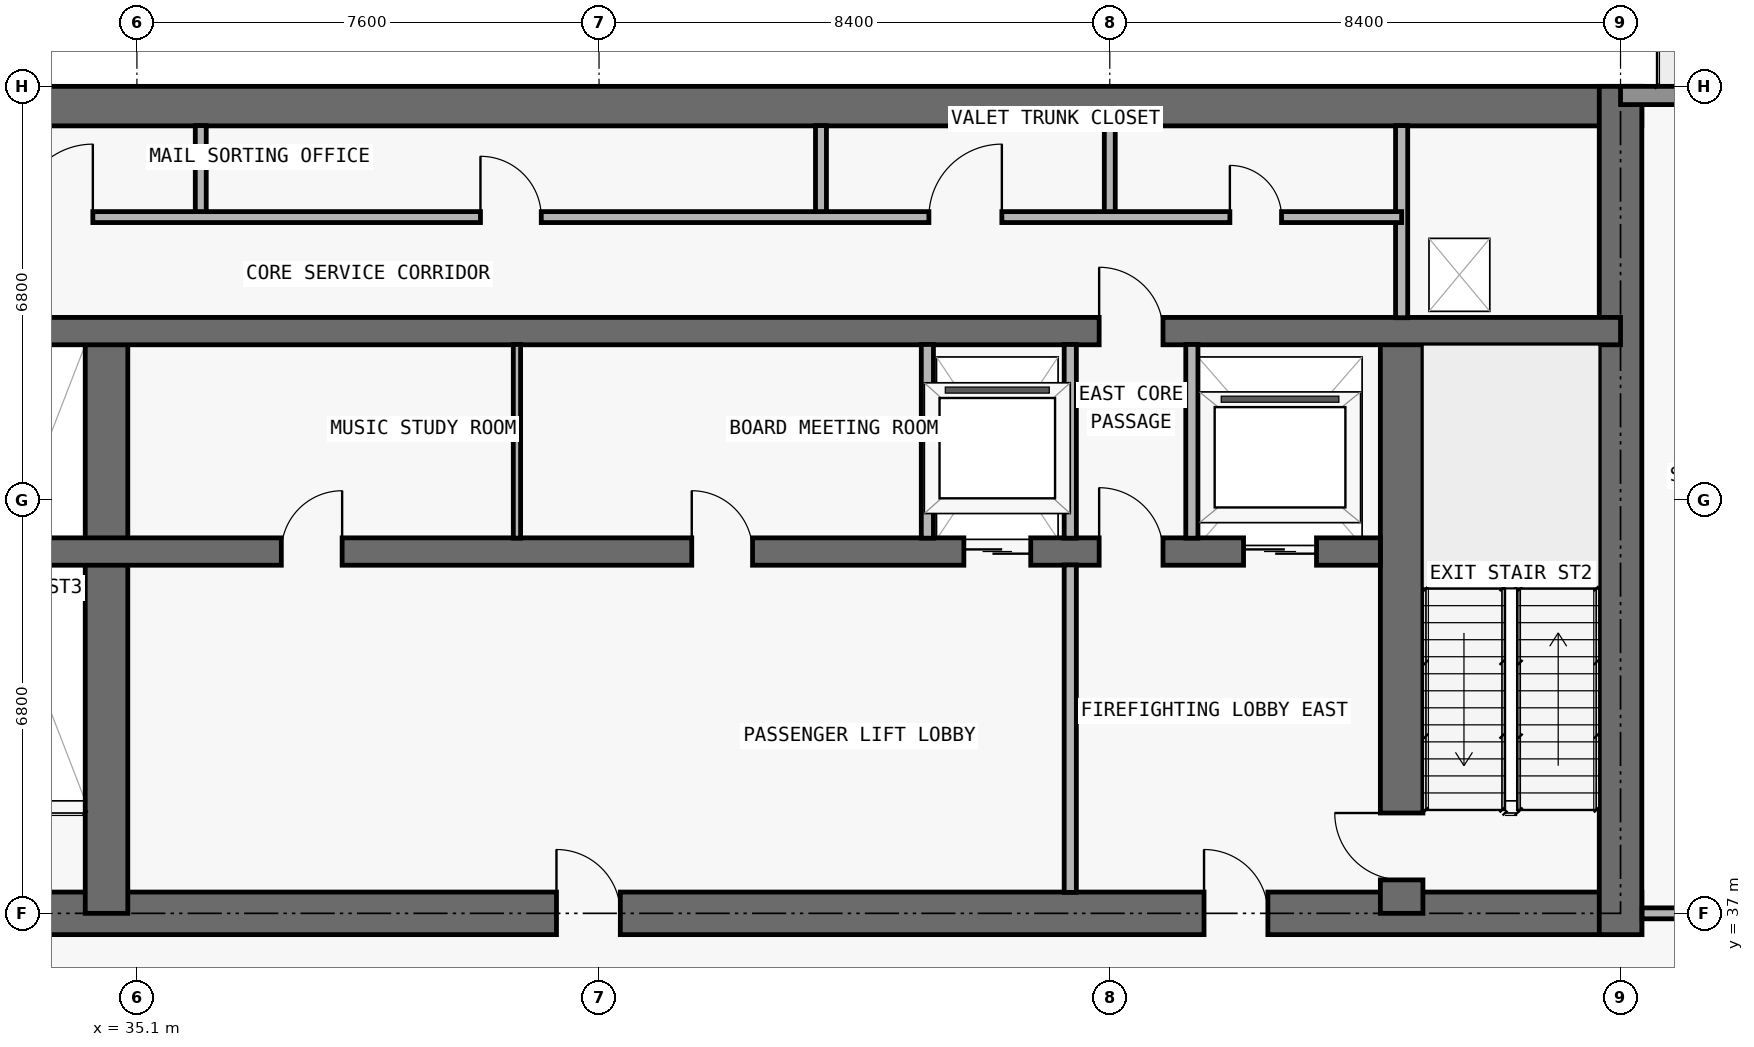
"""IFC4 building model, lengths in metres.
Left out: names, types, materials, properties, quantities, classifications, styles, units other than length and angle.
Written with IfcOpenShell. Run it as: python <this file> out.ifc"""

import sys

from ifc_helpers import new_model, si_unit, direction, frame, frame_2d, origin, place, context, subcontext, project, spatial, rectangle, extrude, element, fill, save


model = new_model("IFC4")
c1 = context("Model", 3, precision=1e-05, world=origin(), true_north=direction((0.0, 1.0)))
c2 = subcontext(c1, "Body", "Model", "MODEL_VIEW")
j1 = project(units=[si_unit("LENGTHUNIT", "METRE"), si_unit("PLANEANGLEUNIT", "RADIAN")], contexts=[c1])
p1 = place(None, origin())
s1 = spatial("IfcSite", under=j1, at=p1, CompositionType="ELEMENT")
p2 = place(p1, origin())
s2 = spatial("IfcBuilding", under=s1, at=p2, CompositionType="ELEMENT")
p3 = place(p2, frame((0.0, 0.0, 269.4)))
s3 = spatial("IfcBuildingStorey", under=s2, at=p3, CompositionType="ELEMENT", Elevation=269.4)
p4 = place(p3, frame((17.95, 37.0, 0.0), z_axis=(0.0, 0.0, 1.0), x_axis=(1.0, 0.0, 0.0)))
e1 = element("IfcWall", 1, at=p4, inside=s3, PredefinedType="SHEAR", context=c2, shape_type="SweptSolid", body=[
    extrude(rectangle(XDim=41.9, YDim=0.7, at=frame_2d((20.95, 0.0))), origin(), (0.0, 0.0, 1.0), 4.5),
])
p5 = place(p4, frame((14.35, 0.0, 0.0)))
e2 = element("IfcOpeningElement", 2, at=p5, cuts=e1, PredefinedType="OPENING", context=c2, shape_type="SweptSolid", body=[
    extrude(rectangle(XDim=1.1, YDim=2.15, at=frame_2d((0.55, 1.075))), frame((0.0, 0.36, 0.0), z_axis=(0.0, -1.0, 0.0), x_axis=(1.0, 0.0, 0.0)), (0.0, 0.0, 1.0), 0.72),
])
p6 = place(p4, frame((6.2, 0.0, 0.0)))
e3 = element("IfcOpeningElement", 3, at=p6, cuts=e1, PredefinedType="OPENING", context=c2, shape_type="SweptSolid", body=[
    extrude(rectangle(XDim=1.05, YDim=2.15, at=frame_2d((0.525, 1.075))), frame((0.0, 0.36, 0.0), z_axis=(0.0, -1.0, 0.0), x_axis=(1.0, 0.0, 0.0)), (0.0, 0.0, 1.0), 0.72),
])
p7 = place(p4, frame((34.7, 0.0, 0.0)))
e4 = element("IfcOpeningElement", 4, at=p7, cuts=e1, PredefinedType="OPENING", context=c2, shape_type="SweptSolid", body=[
    extrude(rectangle(XDim=1.05, YDim=2.15, at=frame_2d((0.525, 1.075))), frame((0.0, 0.36, 0.0), z_axis=(0.0, -1.0, 0.0), x_axis=(1.0, 0.0, 0.0)), (0.0, 0.0, 1.0), 0.72),
])
p8 = place(p4, frame((10.812, 0.0, 0.0)))
e5 = element("IfcOpeningElement", 5, at=p8, cuts=e1, PredefinedType="OPENING", context=c2, shape_type="SweptSolid", body=[
    extrude(rectangle(XDim=1.05, YDim=2.15, at=frame_2d((0.525, 1.075))), frame((0.0, 0.36, 0.0), z_axis=(0.0, -1.0, 0.0), x_axis=(1.0, 0.0, 0.0)), (0.0, 0.0, 1.0), 0.72),
])
p9 = place(p4, frame((24.05, 0.0, 0.0)))
e6 = element("IfcOpeningElement", 6, at=p9, cuts=e1, PredefinedType="OPENING", context=c2, shape_type="SweptSolid", body=[
    extrude(rectangle(XDim=1.05, YDim=2.15, at=frame_2d((0.525, 1.075))), frame((0.0, 0.36, 0.0), z_axis=(0.0, -1.0, 0.0), x_axis=(1.0, 0.0, 0.0)), (0.0, 0.0, 1.0), 0.72),
])
p10 = place(p3, frame((17.95, 50.275, 0.0), z_axis=(0.0, 0.0, 1.0), x_axis=(1.0, 0.0, 0.0)))
e7 = element("IfcWall", 7, at=p10, inside=s3, PredefinedType="SHEAR", context=c2, shape_type="SweptSolid", body=[
    extrude(rectangle(XDim=41.9, YDim=0.65, at=frame_2d((20.95, 0.0))), origin(), (0.0, 0.0, 1.0), 4.5),
])
p11 = place(p3, frame((59.5, 36.65, 0.0), z_axis=(0.0, 0.0, 1.0), x_axis=(0.0, 1.0, 0.0)))
e8 = element("IfcWall", 8, at=p11, inside=s3, PredefinedType="SHEAR", context=c2, shape_type="SweptSolid", body=[
    extrude(rectangle(XDim=13.95, YDim=0.7, at=frame_2d((6.975, 0.0))), origin(), (0.0, 0.0, 1.0), 4.5),
])
p12 = place(p3, frame((55.9, 37.0, 0.0), z_axis=(0.0, 0.0, 1.0), x_axis=(0.0, 1.0, 0.0)))
e9 = element("IfcWall", 9, at=p12, inside=s3, PredefinedType="SHEAR", context=c2, shape_type="SweptSolid", body=[
    extrude(rectangle(XDim=9.575, YDim=0.7, at=frame_2d((4.788, 0.0))), origin(), (0.0, 0.0, 1.0), 4.5),
])
p13 = place(p12, frame((0.55, 0.0, 0.0)))
e10 = element("IfcOpeningElement", 10, at=p13, cuts=e9, PredefinedType="OPENING", context=c2, shape_type="SweptSolid", body=[
    extrude(rectangle(XDim=1.1, YDim=2.15, at=frame_2d((0.55, 1.075))), frame((0.0, 0.36, 0.0), z_axis=(0.0, -1.0, 0.0), x_axis=(1.0, 0.0, 0.0)), (0.0, 0.0, 1.0), 0.72),
])
p14 = place(p3, frame((34.6, 37.0, 0.0), z_axis=(0.0, 0.0, 1.0), x_axis=(0.0, 1.0, 0.0)))
e11 = element("IfcWall", 11, at=p14, inside=s3, PredefinedType="SHEAR", context=c2, shape_type="SweptSolid", body=[
    extrude(rectangle(XDim=9.575, YDim=0.7, at=frame_2d((4.788, 0.0))), origin(), (0.0, 0.0, 1.0), 4.5),
])
p15 = place(p3, frame((22.25, 42.95, 0.0), z_axis=(0.0, 0.0, 1.0), x_axis=(1.0, 0.0, 0.0)))
e12 = element("IfcWall", 12, at=p15, inside=s3, PredefinedType="SHEAR", context=c2, shape_type="SweptSolid", body=[
    extrude(rectangle(XDim=33.3, YDim=0.45, at=frame_2d((16.65, 0.0))), origin(), (0.0, 0.0, 1.0), 4.5),
])
p16 = place(p15, frame((1.05, 0.0, 0.0)))
e13 = element("IfcOpeningElement", 13, at=p16, cuts=e12, PredefinedType="OPENING", context=c2, shape_type="SweptSolid", body=[
    extrude(rectangle(XDim=1.2, YDim=2.2, at=frame_2d((0.6, 1.1))), frame((0.0, 0.235, 0.0), z_axis=(0.0, -1.0, 0.0), x_axis=(1.0, 0.0, 0.0)), (0.0, 0.0, 1.0), 0.47),
])
p17 = place(p15, frame((31.05, 0.0, 0.0)))
e14 = element("IfcOpeningElement", 14, at=p17, cuts=e12, PredefinedType="OPENING", context=c2, shape_type="SweptSolid", body=[
    extrude(rectangle(XDim=1.2, YDim=2.2, at=frame_2d((0.6, 1.1))), frame((0.0, 0.235, 0.0), z_axis=(0.0, -1.0, 0.0), x_axis=(1.0, 0.0, 0.0)), (0.0, 0.0, 1.0), 0.47),
])
p18 = place(p15, frame((26.45, 0.0, 0.0)))
e15 = element("IfcOpeningElement", 15, at=p18, cuts=e12, PredefinedType="OPENING", context=c2, shape_type="SweptSolid", body=[
    extrude(rectangle(XDim=1.1, YDim=2.2, at=frame_2d((0.55, 1.1))), frame((0.0, 0.235, 0.0), z_axis=(0.0, -1.0, 0.0), x_axis=(1.0, 0.0, 0.0)), (0.0, 0.0, 1.0), 0.47),
])
p19 = place(p15, frame((5.95, 0.0, 0.0)))
e16 = element("IfcOpeningElement", 16, at=p19, cuts=e12, PredefinedType="OPENING", context=c2, shape_type="SweptSolid", body=[
    extrude(rectangle(XDim=1.1, YDim=2.2, at=frame_2d((0.55, 1.1))), frame((0.0, 0.235, 0.0), z_axis=(0.0, -1.0, 0.0), x_axis=(1.0, 0.0, 0.0)), (0.0, 0.0, 1.0), 0.47),
])
p20 = place(p15, frame((3.625, 0.0, 0.0)))
e17 = element("IfcOpeningElement", 17, at=p20, cuts=e12, PredefinedType="OPENING", context=c2, shape_type="SweptSolid", body=[
    extrude(rectangle(XDim=1.05, YDim=2.15, at=frame_2d((0.525, 1.075))), frame((0.0, 0.235, 0.0), z_axis=(0.0, -1.0, 0.0), x_axis=(1.0, 0.0, 0.0)), (0.0, 0.0, 1.0), 0.47),
])
p21 = place(p15, frame((28.675, 0.0, 0.0)))
e18 = element("IfcOpeningElement", 18, at=p21, cuts=e12, PredefinedType="OPENING", context=c2, shape_type="SweptSolid", body=[
    extrude(rectangle(XDim=1.05, YDim=2.15, at=frame_2d((0.525, 1.075))), frame((0.0, 0.235, 0.0), z_axis=(0.0, -1.0, 0.0), x_axis=(1.0, 0.0, 0.0)), (0.0, 0.0, 1.0), 0.47),
])
p22 = place(p15, frame((15.225, 0.0, 0.0)))
e19 = element("IfcOpeningElement", 19, at=p22, cuts=e12, PredefinedType="OPENING", context=c2, shape_type="SweptSolid", body=[
    extrude(rectangle(XDim=1.0, YDim=2.2, at=frame_2d((0.5, 1.1))), frame((0.0, 0.235, 0.0), z_axis=(0.0, -1.0, 0.0), x_axis=(1.0, 0.0, 0.0)), (0.0, 0.0, 1.0), 0.47),
])
p23 = place(p15, frame((21.975, 0.0, 0.0)))
e20 = element("IfcOpeningElement", 20, at=p23, cuts=e12, PredefinedType="OPENING", context=c2, shape_type="SweptSolid", body=[
    extrude(rectangle(XDim=1.0, YDim=2.2, at=frame_2d((0.5, 1.1))), frame((0.0, 0.235, 0.0), z_axis=(0.0, -1.0, 0.0), x_axis=(1.0, 0.0, 0.0)), (0.0, 0.0, 1.0), 0.47),
])
p24 = place(p3, frame((18.3, 46.575, 0.0), z_axis=(0.0, 0.0, 1.0), x_axis=(1.0, 0.0, 0.0)))
e21 = element("IfcWall", 21, at=p24, inside=s3, PredefinedType="SHEAR", context=c2, shape_type="SweptSolid", body=[
    extrude(rectangle(XDim=41.2, YDim=0.45, at=frame_2d((20.6, 0.0))), origin(), (0.0, 0.0, 1.0), 4.5),
])
p25 = place(p24, frame((7.575, 0.0, 0.0)))
e22 = element("IfcOpeningElement", 22, at=p25, cuts=e21, PredefinedType="OPENING", context=c2, shape_type="SweptSolid", body=[
    extrude(rectangle(XDim=1.05, YDim=2.15, at=frame_2d((0.525, 1.075))), frame((0.0, 0.235, 0.0), z_axis=(0.0, -1.0, 0.0), x_axis=(1.0, 0.0, 0.0)), (0.0, 0.0, 1.0), 0.47),
])
p26 = place(p24, frame((32.625, 0.0, 0.0)))
e23 = element("IfcOpeningElement", 23, at=p26, cuts=e21, PredefinedType="OPENING", context=c2, shape_type="SweptSolid", body=[
    extrude(rectangle(XDim=1.05, YDim=2.15, at=frame_2d((0.525, 1.075))), frame((0.0, 0.235, 0.0), z_axis=(0.0, -1.0, 0.0), x_axis=(1.0, 0.0, 0.0)), (0.0, 0.0, 1.0), 0.47),
])
p27 = place(p3, frame((59.5, 50.45, 0.0), z_axis=(0.0, 0.0, 1.0), x_axis=(1.0, 0.0, 0.0)))
e24 = element("IfcWall", 24, at=p27, inside=s3, PredefinedType="STANDARD", context=c2, shape_type="SweptSolid", body=[
    extrude(rectangle(XDim=6.2, YDim=0.3, at=frame_2d((3.1, 0.0))), origin(), (0.0, 0.0, 1.0), 4.5),
])
p28 = place(p27, frame((2.1, 0.0, 0.0)))
e25 = element("IfcOpeningElement", 25, at=p28, cuts=e24, PredefinedType="OPENING", context=c2, shape_type="SweptSolid", body=[
    extrude(rectangle(XDim=2.0, YDim=2.3, at=frame_2d((1.0, 1.15))), frame((0.0, 0.16, 0.0), z_axis=(0.0, -1.0, 0.0), x_axis=(1.0, 0.0, 0.0)), (0.0, 0.0, 1.0), 0.32),
])
p29 = place(p3, frame((36.15, 48.45, 0.0), z_axis=(0.0, 0.0, 1.0), x_axis=(0.0, 1.0, 0.0)))
e26 = element("IfcWall", 26, at=p29, inside=s3, PredefinedType="PARTITIONING", context=c2, shape_type="SweptSolid", body=[
    extrude(rectangle(XDim=1.505, YDim=0.18, at=frame_2d((0.752, 0.0))), origin(), (0.0, 0.0, 1.0), 4.5),
])
p30 = place(p3, frame((41.35, 43.17, 0.0), z_axis=(0.0, 0.0, 1.0), x_axis=(0.0, 1.0, 0.0)))
e27 = element("IfcWall", 27, at=p30, inside=s3, PredefinedType="PARTITIONING", context=c2, shape_type="SweptSolid", body=[
    extrude(rectangle(XDim=3.185, YDim=0.12, at=frame_2d((1.593, 0.0))), origin(), (0.0, 0.0, 1.0), 4.5),
])
p31 = place(p3, frame((46.35, 48.45, 0.0), z_axis=(0.0, 0.0, 1.0), x_axis=(0.0, 1.0, 0.0)))
e28 = element("IfcWall", 28, at=p31, inside=s3, PredefinedType="PARTITIONING", context=c2, shape_type="SweptSolid", body=[
    extrude(rectangle(XDim=1.505, YDim=0.18, at=frame_2d((0.752, 0.0))), origin(), (0.0, 0.0, 1.0), 4.5),
])
p32 = place(p3, frame((48.1, 43.17, 0.0), z_axis=(0.0, 0.0, 1.0), x_axis=(0.0, 1.0, 0.0)))
e29 = element("IfcWall", 29, at=p32, inside=s3, PredefinedType="PARTITIONING", context=c2, shape_type="SweptSolid", body=[
    extrude(rectangle(XDim=3.185, YDim=0.2, at=frame_2d((1.593, 0.0))), origin(), (0.0, 0.0, 1.0), 4.5),
])
p33 = place(p3, frame((50.45, 37.345, 0.0), z_axis=(0.0, 0.0, 1.0), x_axis=(0.0, 1.0, 0.0)))
e30 = element("IfcWall", 30, at=p33, inside=s3, PredefinedType="PARTITIONING", context=c2, shape_type="SweptSolid", body=[
    extrude(rectangle(XDim=5.385, YDim=0.2, at=frame_2d((2.692, 0.0))), origin(), (0.0, 0.0, 1.0), 4.5),
])
p34 = place(p3, frame((50.45, 43.17, 0.0), z_axis=(0.0, 0.0, 1.0), x_axis=(0.0, 1.0, 0.0)))
e31 = element("IfcWall", 31, at=p34, inside=s3, PredefinedType="PARTITIONING", context=c2, shape_type="SweptSolid", body=[
    extrude(rectangle(XDim=3.185, YDim=0.2, at=frame_2d((1.593, 0.0))), origin(), (0.0, 0.0, 1.0), 4.5),
])
p35 = place(p3, frame((51.1, 48.45, 0.0), z_axis=(0.0, 0.0, 1.0), x_axis=(0.0, 1.0, 0.0)))
e32 = element("IfcWall", 32, at=p35, inside=s3, PredefinedType="PARTITIONING", context=c2, shape_type="SweptSolid", body=[
    extrude(rectangle(XDim=1.505, YDim=0.18, at=frame_2d((0.752, 0.0))), origin(), (0.0, 0.0, 1.0), 4.5),
])
p36 = place(p3, frame((52.45, 43.17, 0.0), z_axis=(0.0, 0.0, 1.0), x_axis=(0.0, 1.0, 0.0)))
e33 = element("IfcWall", 33, at=p36, inside=s3, PredefinedType="PARTITIONING", context=c2, shape_type="SweptSolid", body=[
    extrude(rectangle(XDim=3.185, YDim=0.2, at=frame_2d((1.593, 0.0))), origin(), (0.0, 0.0, 1.0), 4.5),
])
p37 = place(p3, frame((55.9, 46.795, 0.0), z_axis=(0.0, 0.0, 1.0), x_axis=(0.0, 1.0, 0.0)))
e34 = element("IfcWall", 34, at=p37, inside=s3, PredefinedType="PARTITIONING", context=c2, shape_type="SweptSolid", body=[
    extrude(rectangle(XDim=3.16, YDim=0.2, at=frame_2d((1.58, 0.0))), origin(), (0.0, 0.0, 1.0), 4.5),
])
p38 = place(p3, frame((59.855, 37.0, 0.0), z_axis=(0.0, 0.0, 1.0), x_axis=(1.0, 0.0, 0.0)))
e35 = element("IfcWall", 35, at=p38, inside=s3, PredefinedType="PARTITIONING", context=c2, shape_type="SweptSolid", body=[
    extrude(rectangle(XDim=5.845, YDim=0.18, at=frame_2d((2.922, 0.0))), origin(), (0.0, 0.0, 1.0), 4.5),
])
p39 = place(p38, frame((2.323, 0.0, 0.0)))
e36 = element("IfcOpeningElement", 36, at=p39, cuts=e35, PredefinedType="OPENING", context=c2, shape_type="SweptSolid", body=[
    extrude(rectangle(XDim=1.2, YDim=2.2, at=frame_2d((0.6, 1.1))), frame((0.0, 0.1, 0.0), z_axis=(0.0, -1.0, 0.0), x_axis=(1.0, 0.0, 0.0)), (0.0, 0.0, 1.0), 0.2),
])
p40 = place(p3, frame((26.7, 48.45, 0.0), z_axis=(0.0, 0.0, 1.0), x_axis=(1.0, 0.0, 0.0)))
e37 = element("IfcWall", 37, at=p40, inside=s3, PredefinedType="PARTITIONING", context=c2, shape_type="SweptSolid", body=[
    extrude(rectangle(XDim=29.2, YDim=0.18, at=frame_2d((14.6, 0.0))), origin(), (0.0, 0.0, 1.0), 4.5),
])
p41 = place(p40, frame((1.75, 0.0, 0.0)))
e38 = element("IfcOpeningElement", 38, at=p41, cuts=e37, PredefinedType="OPENING", context=c2, shape_type="SweptSolid", body=[
    extrude(rectangle(XDim=1.2, YDim=2.2, at=frame_2d((0.6, 1.1))), frame((0.0, 0.1, 0.0), z_axis=(0.0, -1.0, 0.0), x_axis=(1.0, 0.0, 0.0)), (0.0, 0.0, 1.0), 0.2),
])
p42 = place(p40, frame((6.475, 0.0, 0.0)))
e39 = element("IfcOpeningElement", 39, at=p42, cuts=e37, PredefinedType="OPENING", context=c2, shape_type="SweptSolid", body=[
    extrude(rectangle(XDim=1.2, YDim=2.2, at=frame_2d((0.6, 1.1))), frame((0.0, 0.1, 0.0), z_axis=(0.0, -1.0, 0.0), x_axis=(1.0, 0.0, 0.0)), (0.0, 0.0, 1.0), 0.2),
])
p43 = place(p40, frame((14.05, 0.0, 0.0)))
e40 = element("IfcOpeningElement", 40, at=p43, cuts=e37, PredefinedType="OPENING", context=c2, shape_type="SweptSolid", body=[
    extrude(rectangle(XDim=1.0, YDim=2.2, at=frame_2d((0.5, 1.1))), frame((0.0, 0.1, 0.0), z_axis=(0.0, -1.0, 0.0), x_axis=(1.0, 0.0, 0.0)), (0.0, 0.0, 1.0), 0.2),
])
p44 = place(p40, frame((21.425, 0.0, 0.0)))
e41 = element("IfcOpeningElement", 41, at=p44, cuts=e37, PredefinedType="OPENING", context=c2, shape_type="SweptSolid", body=[
    extrude(rectangle(XDim=1.2, YDim=2.2, at=frame_2d((0.6, 1.1))), frame((0.0, 0.1, 0.0), z_axis=(0.0, -1.0, 0.0), x_axis=(1.0, 0.0, 0.0)), (0.0, 0.0, 1.0), 0.2),
])
p45 = place(p40, frame((26.375, 0.0, 0.0)))
e42 = element("IfcOpeningElement", 42, at=p45, cuts=e37, PredefinedType="OPENING", context=c2, shape_type="SweptSolid", body=[
    extrude(rectangle(XDim=0.85, YDim=2.1, at=frame_2d((0.425, 1.05))), frame((0.0, 0.1, 0.0), z_axis=(0.0, -1.0, 0.0), x_axis=(1.0, 0.0, 0.0)), (0.0, 0.0, 1.0), 0.2),
])
p46 = place(p17, origin())
e43 = element("IfcDoor", 43, at=p46, inside=s3, OperationType="DOUBLE_DOOR_SLIDING", PredefinedType="DOOR", context=c2, shape_type="SweptSolid", body=[
    extrude(rectangle(XDim=1.2, YDim=2.2, at=frame_2d((0.6, 1.1))), frame((0.0, 0.025, 0.0), z_axis=(0.0, -1.0, 0.0), x_axis=(1.0, 0.0, 0.0)), (0.0, 0.0, 1.0), 0.05),
])
fill(e14, e43)
p47 = place(p18, origin())
e44 = element("IfcDoor", 44, at=p47, inside=s3, OperationType="DOUBLE_DOOR_SLIDING", PredefinedType="DOOR", context=c2, shape_type="SweptSolid", body=[
    extrude(rectangle(XDim=1.1, YDim=2.2, at=frame_2d((0.55, 1.1))), frame((0.0, 0.025, 0.0), z_axis=(0.0, -1.0, 0.0), x_axis=(1.0, 0.0, 0.0)), (0.0, 0.0, 1.0), 0.05),
])
fill(e15, e44)
p48 = place(p7, origin())
e45 = element("IfcDoor", 45, at=p48, inside=s3, OperationType="SINGLE_SWING_LEFT", PredefinedType="DOOR", context=c2, shape_type="SweptSolid", body=[
    extrude(rectangle(XDim=1.05, YDim=2.15, at=frame_2d((0.525, 1.075))), frame((0.0, 0.025, 0.0), z_axis=(0.0, -1.0, 0.0), x_axis=(1.0, 0.0, 0.0)), (0.0, 0.0, 1.0), 0.05),
])
fill(e4, e45)
p49 = place(p13, origin())
e46 = element("IfcDoor", 46, at=p49, inside=s3, OperationType="SINGLE_SWING_RIGHT", PredefinedType="DOOR", context=c2, shape_type="SweptSolid", body=[
    extrude(rectangle(XDim=1.1, YDim=2.15, at=frame_2d((0.55, 1.075))), frame((0.0, 0.025, 0.0), z_axis=(0.0, -1.0, 0.0), x_axis=(1.0, 0.0, 0.0)), (0.0, 0.0, 1.0), 0.05),
])
fill(e10, e46)
p50 = place(p21, origin())
e47 = element("IfcDoor", 47, at=p50, inside=s3, OperationType="SINGLE_SWING_LEFT", PredefinedType="DOOR", context=c2, shape_type="SweptSolid", body=[
    extrude(rectangle(XDim=1.05, YDim=2.15, at=frame_2d((0.525, 1.075))), frame((0.0, 0.025, 0.0), z_axis=(0.0, -1.0, 0.0), x_axis=(1.0, 0.0, 0.0)), (0.0, 0.0, 1.0), 0.05),
])
fill(e18, e47)
p51 = place(p9, origin())
e48 = element("IfcDoor", 48, at=p51, inside=s3, OperationType="SINGLE_SWING_LEFT", PredefinedType="DOOR", context=c2, shape_type="SweptSolid", body=[
    extrude(rectangle(XDim=1.05, YDim=2.15, at=frame_2d((0.525, 1.075))), frame((0.0, 0.025, 0.0), z_axis=(0.0, -1.0, 0.0), x_axis=(1.0, 0.0, 0.0)), (0.0, 0.0, 1.0), 0.05),
])
fill(e6, e48)
p52 = place(p22, origin())
e49 = element("IfcDoor", 49, at=p52, inside=s3, OperationType="SINGLE_SWING_RIGHT", PredefinedType="DOOR", context=c2, shape_type="SweptSolid", body=[
    extrude(rectangle(XDim=1.0, YDim=2.2, at=frame_2d((0.5, 1.1))), frame((0.0, 0.025, 0.0), z_axis=(0.0, -1.0, 0.0), x_axis=(1.0, 0.0, 0.0)), (0.0, 0.0, 1.0), 0.05),
])
fill(e19, e49)
p53 = place(p23, origin())
e50 = element("IfcDoor", 50, at=p53, inside=s3, OperationType="SINGLE_SWING_LEFT", PredefinedType="DOOR", context=c2, shape_type="SweptSolid", body=[
    extrude(rectangle(XDim=1.0, YDim=2.2, at=frame_2d((0.5, 1.1))), frame((0.0, 0.025, 0.0), z_axis=(0.0, -1.0, 0.0), x_axis=(1.0, 0.0, 0.0)), (0.0, 0.0, 1.0), 0.05),
])
fill(e20, e50)
p54 = place(p26, origin())
e51 = element("IfcDoor", 51, at=p54, inside=s3, OperationType="SINGLE_SWING_LEFT", PredefinedType="DOOR", context=c2, shape_type="SweptSolid", body=[
    extrude(rectangle(XDim=1.05, YDim=2.15, at=frame_2d((0.525, 1.075))), frame((0.0, 0.025, 0.0), z_axis=(0.0, -1.0, 0.0), x_axis=(1.0, 0.0, 0.0)), (0.0, 0.0, 1.0), 0.05),
])
fill(e23, e51)
p55 = place(p42, origin())
e52 = element("IfcDoor", 52, at=p55, inside=s3, OperationType="SINGLE_SWING_RIGHT", PredefinedType="DOOR", context=c2, shape_type="SweptSolid", body=[
    extrude(rectangle(XDim=1.2, YDim=2.2, at=frame_2d((0.6, 1.1))), frame((0.0, 0.025, 0.0), z_axis=(0.0, -1.0, 0.0), x_axis=(1.0, 0.0, 0.0)), (0.0, 0.0, 1.0), 0.05),
])
fill(e39, e52)
p56 = place(p43, origin())
e53 = element("IfcDoor", 53, at=p56, inside=s3, OperationType="SINGLE_SWING_LEFT", PredefinedType="DOOR", context=c2, shape_type="SweptSolid", body=[
    extrude(rectangle(XDim=1.0, YDim=2.2, at=frame_2d((0.5, 1.1))), frame((0.0, 0.025, 0.0), z_axis=(0.0, -1.0, 0.0), x_axis=(1.0, 0.0, 0.0)), (0.0, 0.0, 1.0), 0.05),
])
fill(e40, e53)
p57 = place(p44, origin())
e54 = element("IfcDoor", 54, at=p57, inside=s3, OperationType="SINGLE_SWING_RIGHT", PredefinedType="DOOR", context=c2, shape_type="SweptSolid", body=[
    extrude(rectangle(XDim=1.2, YDim=2.2, at=frame_2d((0.6, 1.1))), frame((0.0, 0.025, 0.0), z_axis=(0.0, -1.0, 0.0), x_axis=(1.0, 0.0, 0.0)), (0.0, 0.0, 1.0), 0.05),
])
fill(e41, e54)
p58 = place(p45, origin())
e55 = element("IfcDoor", 55, at=p58, inside=s3, OperationType="SINGLE_SWING_LEFT", PredefinedType="DOOR", context=c2, shape_type="SweptSolid", body=[
    extrude(rectangle(XDim=0.85, YDim=2.1, at=frame_2d((0.425, 1.05))), frame((0.0, 0.025, 0.0), z_axis=(0.0, -1.0, 0.0), x_axis=(1.0, 0.0, 0.0)), (0.0, 0.0, 1.0), 0.05),
])
fill(e42, e55)
save(model, sys.argv[1])
